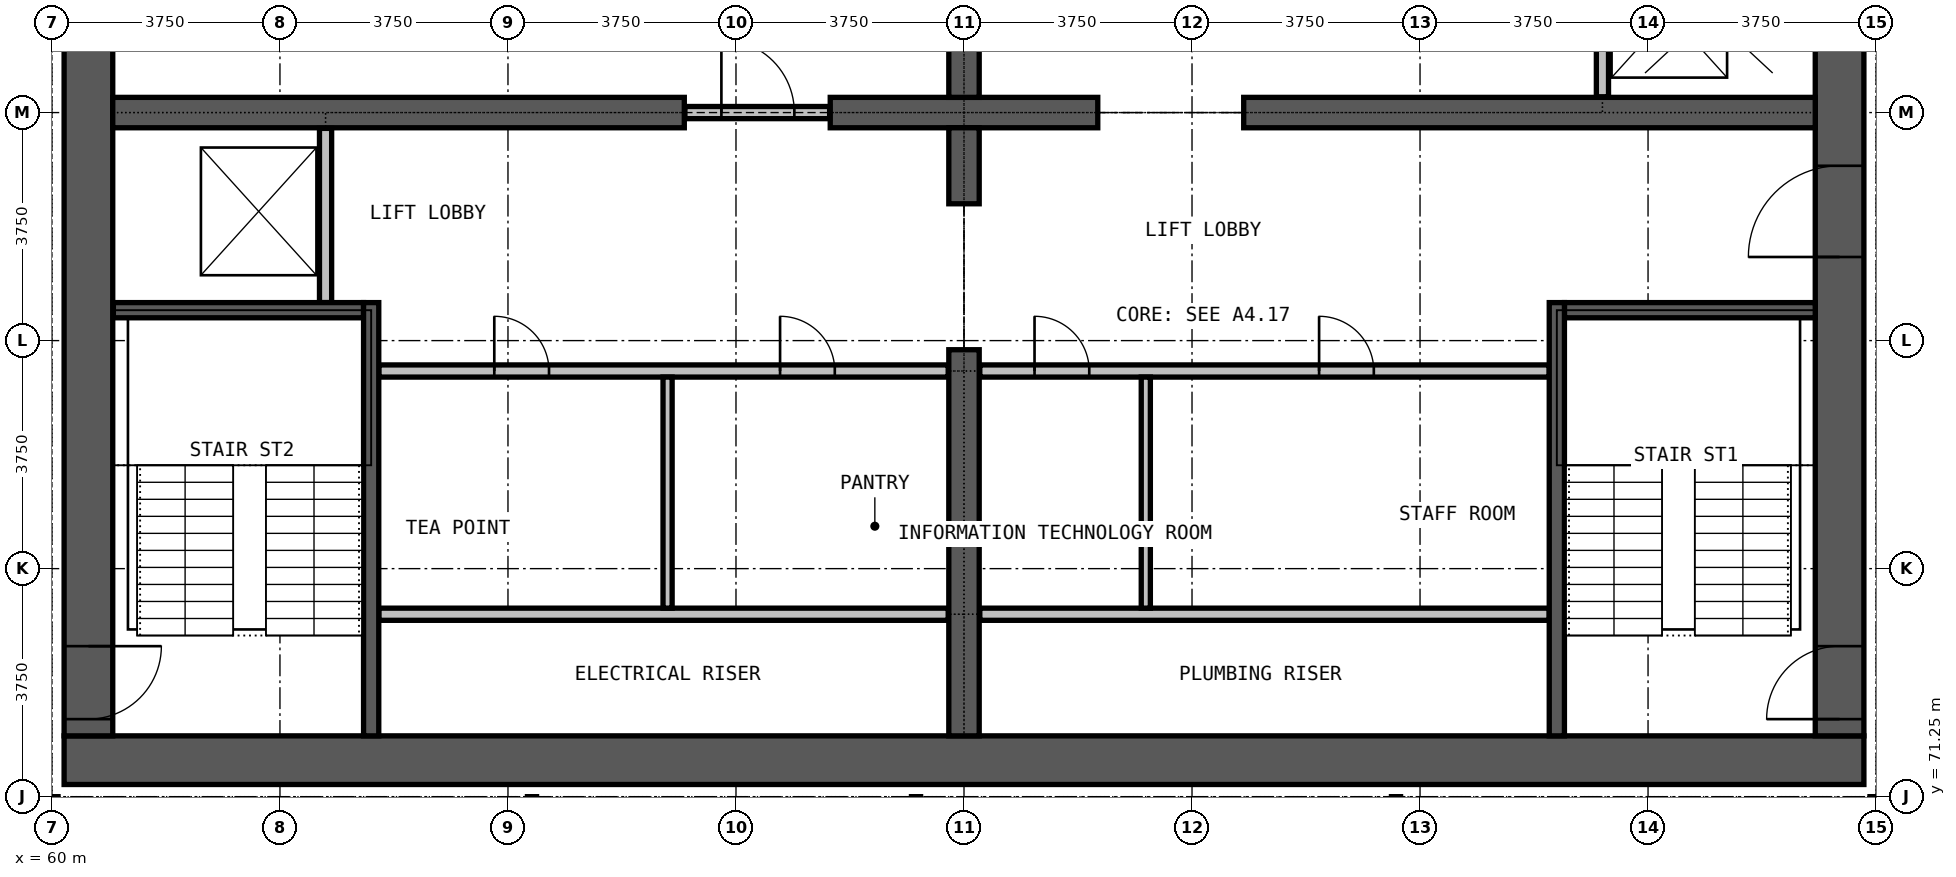
"""IFC4 building model, lengths in metres.
Left out: names, types, materials, properties, quantities, classifications, styles, units other than length and angle.
Written with IfcOpenShell. Run it as: python <this file> out.ifc"""

import sys

from ifc_helpers import new_model, si_unit, direction, frame, frame_2d, origin, place, context, subcontext, project, spatial, rectangle, extrude, element, fill, save


model = new_model("IFC4")
c1 = context("Model", 3, precision=1e-05, world=origin(), true_north=direction((0.0, 1.0)))
c2 = subcontext(c1, "Body", "Model", "MODEL_VIEW")
j1 = project(units=[si_unit("LENGTHUNIT", "METRE"), si_unit("PLANEANGLEUNIT", "RADIAN")], contexts=[c1])
p1 = place(None, origin())
s1 = spatial("IfcSite", under=j1, at=p1, CompositionType="ELEMENT")
p2 = place(p1, origin())
s2 = spatial("IfcBuilding", under=s1, at=p2, CompositionType="ELEMENT")
p3 = place(p2, frame((0.0, 0.0, 158.5)))
s3 = spatial("IfcBuildingStorey", under=s2, at=p3, CompositionType="ELEMENT", Elevation=158.5)
p4 = place(p3, frame((60.2, 71.85, 0.0), z_axis=(0.0, 0.0, 1.0), x_axis=(1.0, 0.0, 0.0)))
e1 = element("IfcWall", 1, at=p4, inside=s3, PredefinedType="SHEAR", context=c2, shape_type="SweptSolid", body=[
    extrude(rectangle(XDim=29.6, YDim=0.8, at=frame_2d((14.8, 0.0))), origin(), (0.0, 0.0, 1.0), 3.6),
])
p5 = place(p3, frame((89.4, 72.25, 0.0), z_axis=(0.0, 0.0, 1.0), x_axis=(0.0, 1.0, 0.0)))
e2 = element("IfcWall", 2, at=p5, inside=s3, PredefinedType="SHEAR", context=c2, shape_type="SweptSolid", body=[
    extrude(rectangle(XDim=20.5, YDim=0.8, at=frame_2d((10.25, 0.0))), origin(), (0.0, 0.0, 1.0), 3.6),
])
p6 = place(p5, frame((0.275, 0.0, 0.0)))
e3 = element("IfcOpeningElement", 3, at=p6, cuts=e2, PredefinedType="OPENING", context=c2, shape_type="SweptSolid", body=[
    extrude(rectangle(XDim=1.2, YDim=2.2, at=frame_2d((0.6, 1.1))), frame((0.0, 0.41, 0.0), z_axis=(0.0, -1.0, 0.0), x_axis=(1.0, 0.0, 0.0)), (0.0, 0.0, 1.0), 0.82),
])
p7 = place(p5, frame((13.775, 0.0, 0.0)))
e4 = element("IfcOpeningElement", 4, at=p7, cuts=e2, PredefinedType="OPENING", context=c2, shape_type="SweptSolid", body=[
    extrude(rectangle(XDim=1.2, YDim=2.2, at=frame_2d((0.6, 1.1))), frame((0.0, 0.41, 0.0), z_axis=(0.0, -1.0, 0.0), x_axis=(1.0, 0.0, 0.0)), (0.0, 0.0, 1.0), 0.82),
])
p8 = place(p5, frame((7.875, 0.0, 0.0)))
e5 = element("IfcOpeningElement", 5, at=p8, cuts=e2, PredefinedType="OPENING", context=c2, shape_type="SweptSolid", body=[
    extrude(rectangle(XDim=1.5, YDim=2.2, at=frame_2d((0.75, 1.1))), frame((0.0, 0.41, 0.0), z_axis=(0.0, -1.0, 0.0), x_axis=(1.0, 0.0, 0.0)), (0.0, 0.0, 1.0), 0.82),
])
p9 = place(p3, frame((60.6, 92.75, 0.0), z_axis=(0.0, 0.0, 1.0), x_axis=(0.0, -1.0, 0.0)))
e6 = element("IfcWall", 6, at=p9, inside=s3, PredefinedType="SHEAR", context=c2, shape_type="SweptSolid", body=[
    extrude(rectangle(XDim=20.5, YDim=0.8, at=frame_2d((10.25, 0.0))), origin(), (0.0, 0.0, 1.0), 3.6),
])
p10 = place(p9, frame((19.025, 0.0, 0.0)))
e7 = element("IfcOpeningElement", 7, at=p10, cuts=e6, PredefinedType="OPENING", context=c2, shape_type="SweptSolid", body=[
    extrude(rectangle(XDim=1.2, YDim=2.2, at=frame_2d((0.6, 1.1))), frame((0.0, 0.41, 0.0), z_axis=(0.0, -1.0, 0.0), x_axis=(1.0, 0.0, 0.0)), (0.0, 0.0, 1.0), 0.82),
])
p11 = place(p9, frame((8.025, 0.0, 0.0)))
e8 = element("IfcOpeningElement", 8, at=p11, cuts=e6, PredefinedType="OPENING", context=c2, shape_type="SweptSolid", body=[
    extrude(rectangle(XDim=1.2, YDim=2.2, at=frame_2d((0.6, 1.1))), frame((0.0, 0.41, 0.0), z_axis=(0.0, -1.0, 0.0), x_axis=(1.0, 0.0, 0.0)), (0.0, 0.0, 1.0), 0.82),
])
p12 = place(p3, frame((61.0, 82.5, 0.0), z_axis=(0.0, 0.0, 1.0), x_axis=(1.0, 0.0, 0.0)))
e9 = element("IfcWall", 9, at=p12, inside=s3, PredefinedType="SHEAR", context=c2, shape_type="SweptSolid", body=[
    extrude(rectangle(XDim=9.4, YDim=0.5, at=frame_2d((4.7, 0.0))), origin(), (0.0, 0.0, 1.0), 3.6),
])
p13 = place(p3, frame((72.8, 82.5, 0.0), z_axis=(0.0, 0.0, 1.0), x_axis=(1.0, 0.0, 0.0)))
e10 = element("IfcWall", 10, at=p13, inside=s3, PredefinedType="SHEAR", context=c2, shape_type="SweptSolid", body=[
    extrude(rectangle(XDim=4.4, YDim=0.5, at=frame_2d((2.2, 0.0))), origin(), (0.0, 0.0, 1.0), 3.6),
])
p14 = place(p3, frame((79.6, 82.5, 0.0), z_axis=(0.0, 0.0, 1.0), x_axis=(1.0, 0.0, 0.0)))
e11 = element("IfcWall", 11, at=p14, inside=s3, PredefinedType="SHEAR", context=c2, shape_type="SweptSolid", body=[
    extrude(rectangle(XDim=9.4, YDim=0.5, at=frame_2d((4.7, 0.0))), origin(), (0.0, 0.0, 1.0), 3.6),
])
p15 = place(p3, frame((75.0, 72.25, 0.0), z_axis=(0.0, 0.0, 1.0), x_axis=(0.0, 1.0, 0.0)))
e12 = element("IfcWall", 12, at=p15, inside=s3, PredefinedType="SHEAR", context=c2, shape_type="SweptSolid", body=[
    extrude(rectangle(XDim=6.35, YDim=0.5, at=frame_2d((3.175, 0.0))), origin(), (0.0, 0.0, 1.0), 3.6),
])
for number, where, z_axis, x_axis in (
    (13, (75.0, 81.0, 0.0), (0.0, 0.0, 1.0), (0.0, 1.0, 0.0)),
    (14, (75.0, 82.75, 0.0), (0.0, 0.0, 1.0), (0.0, 1.0, 0.0)),
):
    element("IfcWall", number, at=place(p3, frame(where, z_axis=z_axis, x_axis=x_axis)), inside=s3, PredefinedType="SHEAR", context=c2, shape_type="SweptSolid", body=[
        extrude(rectangle(XDim=1.25, YDim=0.5, at=frame_2d((0.625, 0.0))), origin(), (0.0, 0.0, 1.0), 3.6),
    ])
for number, where, z_axis, x_axis in (
    (15, (65.375, 74.25, 0.0), (0.0, 0.0, 1.0), (1.0, 0.0, 0.0)),
    (16, (75.26, 74.25, 0.0), (0.0, 0.0, 1.0), (1.0, 0.0, 0.0)),
):
    element("IfcWall", number, at=place(p3, frame(where, z_axis=z_axis, x_axis=x_axis)), inside=s3, PredefinedType="PARTITIONING", context=c2, shape_type="SweptSolid", body=[
        extrude(rectangle(XDim=9.365, YDim=0.2, at=frame_2d((4.683, 0.0))), origin(), (0.0, 0.0, 1.0), 3.3),
    ])
p16 = place(p3, frame((65.375, 78.25, 0.0), z_axis=(0.0, 0.0, 1.0), x_axis=(1.0, 0.0, 0.0)))
e17 = element("IfcWall", 17, at=p16, inside=s3, PredefinedType="PARTITIONING", context=c2, shape_type="SweptSolid", body=[
    extrude(rectangle(XDim=9.365, YDim=0.2, at=frame_2d((4.683, 0.0))), origin(), (0.0, 0.0, 1.0), 3.3),
])
p17 = place(p16, frame((1.9, 0.0, 0.0)))
e18 = element("IfcOpeningElement", 18, at=p17, cuts=e17, PredefinedType="OPENING", context=c2, shape_type="SweptSolid", body=[
    extrude(rectangle(XDim=0.9, YDim=2.2, at=frame_2d((0.45, 1.1))), frame((0.0, 0.11, 0.0), z_axis=(0.0, -1.0, 0.0), x_axis=(1.0, 0.0, 0.0)), (0.0, 0.0, 1.0), 0.22),
])
p18 = place(p16, frame((6.6, 0.0, 0.0)))
e19 = element("IfcOpeningElement", 19, at=p18, cuts=e17, PredefinedType="OPENING", context=c2, shape_type="SweptSolid", body=[
    extrude(rectangle(XDim=0.9, YDim=2.2, at=frame_2d((0.45, 1.1))), frame((0.0, 0.11, 0.0), z_axis=(0.0, -1.0, 0.0), x_axis=(1.0, 0.0, 0.0)), (0.0, 0.0, 1.0), 0.22),
])
p19 = place(p3, frame((75.26, 78.25, 0.0), z_axis=(0.0, 0.0, 1.0), x_axis=(1.0, 0.0, 0.0)))
e20 = element("IfcWall", 20, at=p19, inside=s3, PredefinedType="PARTITIONING", context=c2, shape_type="SweptSolid", body=[
    extrude(rectangle(XDim=9.365, YDim=0.2, at=frame_2d((4.683, 0.0))), origin(), (0.0, 0.0, 1.0), 3.3),
])
p20 = place(p19, frame((0.9, 0.0, 0.0)))
e21 = element("IfcOpeningElement", 21, at=p20, cuts=e20, PredefinedType="OPENING", context=c2, shape_type="SweptSolid", body=[
    extrude(rectangle(XDim=0.9, YDim=2.2, at=frame_2d((0.45, 1.1))), frame((0.0, 0.11, 0.0), z_axis=(0.0, -1.0, 0.0), x_axis=(1.0, 0.0, 0.0)), (0.0, 0.0, 1.0), 0.22),
])
p21 = place(p19, frame((5.58, 0.0, 0.0)))
e22 = element("IfcOpeningElement", 22, at=p21, cuts=e20, PredefinedType="OPENING", context=c2, shape_type="SweptSolid", body=[
    extrude(rectangle(XDim=0.9, YDim=2.2, at=frame_2d((0.45, 1.1))), frame((0.0, 0.11, 0.0), z_axis=(0.0, -1.0, 0.0), x_axis=(1.0, 0.0, 0.0)), (0.0, 0.0, 1.0), 0.22),
])
p22 = place(p3, frame((70.41, 82.5, 0.0), z_axis=(0.0, 0.0, 1.0), x_axis=(1.0, 0.0, 0.0)))
e23 = element("IfcWall", 23, at=p22, inside=s3, PredefinedType="PARTITIONING", context=c2, shape_type="SweptSolid", body=[
    extrude(rectangle(XDim=2.38, YDim=0.2, at=frame_2d((1.19, 0.0))), origin(), (0.0, 0.0, 1.0), 2.4),
])
p23 = place(p22, frame((0.6, 0.0, 0.0)))
e24 = element("IfcOpeningElement", 24, at=p23, cuts=e23, PredefinedType="OPENING", context=c2, shape_type="SweptSolid", body=[
    extrude(rectangle(XDim=1.2, YDim=2.2, at=frame_2d((0.6, 1.1))), frame((0.0, 0.11, 0.0), z_axis=(0.0, -1.0, 0.0), x_axis=(1.0, 0.0, 0.0)), (0.0, 0.0, 1.0), 0.22),
])
for number, where, z_axis, x_axis in (
    (25, (70.125, 74.35, 0.0), (0.0, 0.0, 1.0), (0.0, 1.0, 0.0)),
    (26, (77.99, 74.35, 0.0), (0.0, 0.0, 1.0), (0.0, 1.0, 0.0)),
):
    element("IfcWall", number, at=place(p3, frame(where, z_axis=z_axis, x_axis=x_axis)), inside=s3, PredefinedType="PARTITIONING", context=c2, shape_type="SweptSolid", body=[
        extrude(rectangle(XDim=3.8, YDim=0.15, at=frame_2d((1.9, 0.0))), origin(), (0.0, 0.0, 1.0), 3.3),
    ])
p24 = place(p3, frame((64.5, 79.375, 0.0), z_axis=(0.0, 0.0, 1.0), x_axis=(0.0, 1.0, 0.0)))
e27 = element("IfcWall", 27, at=p24, inside=s3, PredefinedType="PARTITIONING", context=c2, shape_type="SweptSolid", body=[
    extrude(rectangle(XDim=2.865, YDim=0.2, at=frame_2d((1.433, 0.0))), origin(), (0.0, 0.0, 1.0), 3.3),
])
p25 = place(p3, frame((85.5, 82.76, 0.0), z_axis=(0.0, 0.0, 1.0), x_axis=(0.0, 1.0, 0.0)))
e28 = element("IfcWall", 28, at=p25, inside=s3, PredefinedType="PARTITIONING", context=c2, shape_type="SweptSolid", body=[
    extrude(rectangle(XDim=2.865, YDim=0.2, at=frame_2d((1.433, 0.0))), origin(), (0.0, 0.0, 1.0), 3.3),
])
p26 = place(p25, frame((0.9, 0.0, 0.0)))
e29 = element("IfcOpeningElement", 29, at=p26, cuts=e28, PredefinedType="OPENING", context=c2, shape_type="SweptSolid", body=[
    extrude(rectangle(XDim=1.1, YDim=2.2, at=frame_2d((0.55, 1.1))), frame((0.0, 0.11, 0.0), z_axis=(0.0, -1.0, 0.0), x_axis=(1.0, 0.0, 0.0)), (0.0, 0.0, 1.0), 0.22),
])
p27 = place(p3, frame((61.01, 79.25, 0.0), z_axis=(0.0, 0.0, 1.0), x_axis=(1.0, 0.0, 0.0)))
e30 = element("IfcWall", 30, at=p27, inside=s3, PredefinedType="PARTITIONING", context=c2, shape_type="SweptSolid", body=[
    extrude(rectangle(XDim=4.115, YDim=0.25, at=frame_2d((2.058, 0.0))), origin(), (0.0, 0.0, 1.0), 3.3),
])
p28 = place(p3, frame((84.875, 79.25, 0.0), z_axis=(0.0, 0.0, 1.0), x_axis=(1.0, 0.0, 0.0)))
e31 = element("IfcWall", 31, at=p28, inside=s3, PredefinedType="PARTITIONING", context=c2, shape_type="SweptSolid", body=[
    extrude(rectangle(XDim=4.125, YDim=0.25, at=frame_2d((2.062, 0.0))), origin(), (0.0, 0.0, 1.0), 3.3),
])
for number, where, z_axis, x_axis in (
    (32, (65.25, 72.25, 0.0), (0.0, 0.0, 1.0), (0.0, 1.0, 0.0)),
    (33, (84.75, 72.25, 0.0), (0.0, 0.0, 1.0), (0.0, 1.0, 0.0)),
):
    element("IfcWall", number, at=place(p3, frame(where, z_axis=z_axis, x_axis=x_axis)), inside=s3, PredefinedType="PARTITIONING", context=c2, shape_type="SweptSolid", body=[
        extrude(rectangle(XDim=7.125, YDim=0.25, at=frame_2d((3.562, 0.0))), origin(), (0.0, 0.0, 1.0), 3.3),
    ])
p29 = place(p23, origin())
e34 = element("IfcDoor", 34, at=p29, inside=s3, OperationType="SINGLE_SWING_RIGHT", PredefinedType="DOOR", context=c2, shape_type="SweptSolid", body=[
    extrude(rectangle(XDim=1.2, YDim=2.2, at=frame_2d((0.6, 1.1))), frame((0.0, 0.025, 0.0), z_axis=(0.0, -1.0, 0.0), x_axis=(1.0, 0.0, 0.0)), (0.0, 0.0, 1.0), 0.05),
])
fill(e24, e34)
p30 = place(p6, origin())
e35 = element("IfcDoor", 35, at=p30, inside=s3, OperationType="SINGLE_SWING_LEFT", PredefinedType="DOOR", context=c2, shape_type="SweptSolid", body=[
    extrude(rectangle(XDim=1.2, YDim=2.2, at=frame_2d((0.6, 1.1))), frame((0.0, 0.025, 0.0), z_axis=(0.0, -1.0, 0.0), x_axis=(1.0, 0.0, 0.0)), (0.0, 0.0, 1.0), 0.05),
])
fill(e3, e35)
p31 = place(p10, origin())
e36 = element("IfcDoor", 36, at=p31, inside=s3, OperationType="SINGLE_SWING_LEFT", PredefinedType="DOOR", context=c2, shape_type="SweptSolid", body=[
    extrude(rectangle(XDim=1.2, YDim=2.2, at=frame_2d((0.6, 1.1))), frame((0.0, 0.025, 0.0), z_axis=(0.0, -1.0, 0.0), x_axis=(1.0, 0.0, 0.0)), (0.0, 0.0, 1.0), 0.05),
])
fill(e7, e36)
p32 = place(p8, origin())
e37 = element("IfcDoor", 37, at=p32, inside=s3, OperationType="DOUBLE_DOOR_SINGLE_SWING", PredefinedType="DOOR", context=c2, shape_type="SweptSolid", body=[
    extrude(rectangle(XDim=1.5, YDim=2.2, at=frame_2d((0.75, 1.1))), frame((0.0, 0.025, 0.0), z_axis=(0.0, -1.0, 0.0), x_axis=(1.0, 0.0, 0.0)), (0.0, 0.0, 1.0), 0.05),
])
fill(e5, e37)
p33 = place(p17, origin())
e38 = element("IfcDoor", 38, at=p33, inside=s3, OperationType="SINGLE_SWING_RIGHT", PredefinedType="DOOR", context=c2, shape_type="SweptSolid", body=[
    extrude(rectangle(XDim=0.9, YDim=2.2, at=frame_2d((0.45, 1.1))), frame((0.0, 0.025, 0.0), z_axis=(0.0, -1.0, 0.0), x_axis=(1.0, 0.0, 0.0)), (0.0, 0.0, 1.0), 0.05),
])
fill(e18, e38)
p34 = place(p18, origin())
e39 = element("IfcDoor", 39, at=p34, inside=s3, OperationType="SINGLE_SWING_LEFT", PredefinedType="DOOR", context=c2, shape_type="SweptSolid", body=[
    extrude(rectangle(XDim=0.9, YDim=2.2, at=frame_2d((0.45, 1.1))), frame((0.0, 0.025, 0.0), z_axis=(0.0, -1.0, 0.0), x_axis=(1.0, 0.0, 0.0)), (0.0, 0.0, 1.0), 0.05),
])
fill(e19, e39)
p35 = place(p20, origin())
e40 = element("IfcDoor", 40, at=p35, inside=s3, OperationType="SINGLE_SWING_LEFT", PredefinedType="DOOR", context=c2, shape_type="SweptSolid", body=[
    extrude(rectangle(XDim=0.9, YDim=2.2, at=frame_2d((0.45, 1.1))), frame((0.0, 0.025, 0.0), z_axis=(0.0, -1.0, 0.0), x_axis=(1.0, 0.0, 0.0)), (0.0, 0.0, 1.0), 0.05),
])
fill(e21, e40)
p36 = place(p21, origin())
e41 = element("IfcDoor", 41, at=p36, inside=s3, OperationType="SINGLE_SWING_LEFT", PredefinedType="DOOR", context=c2, shape_type="SweptSolid", body=[
    extrude(rectangle(XDim=0.9, YDim=2.2, at=frame_2d((0.45, 1.1))), frame((0.0, 0.025, 0.0), z_axis=(0.0, -1.0, 0.0), x_axis=(1.0, 0.0, 0.0)), (0.0, 0.0, 1.0), 0.05),
])
fill(e22, e41)
save(model, sys.argv[1])
